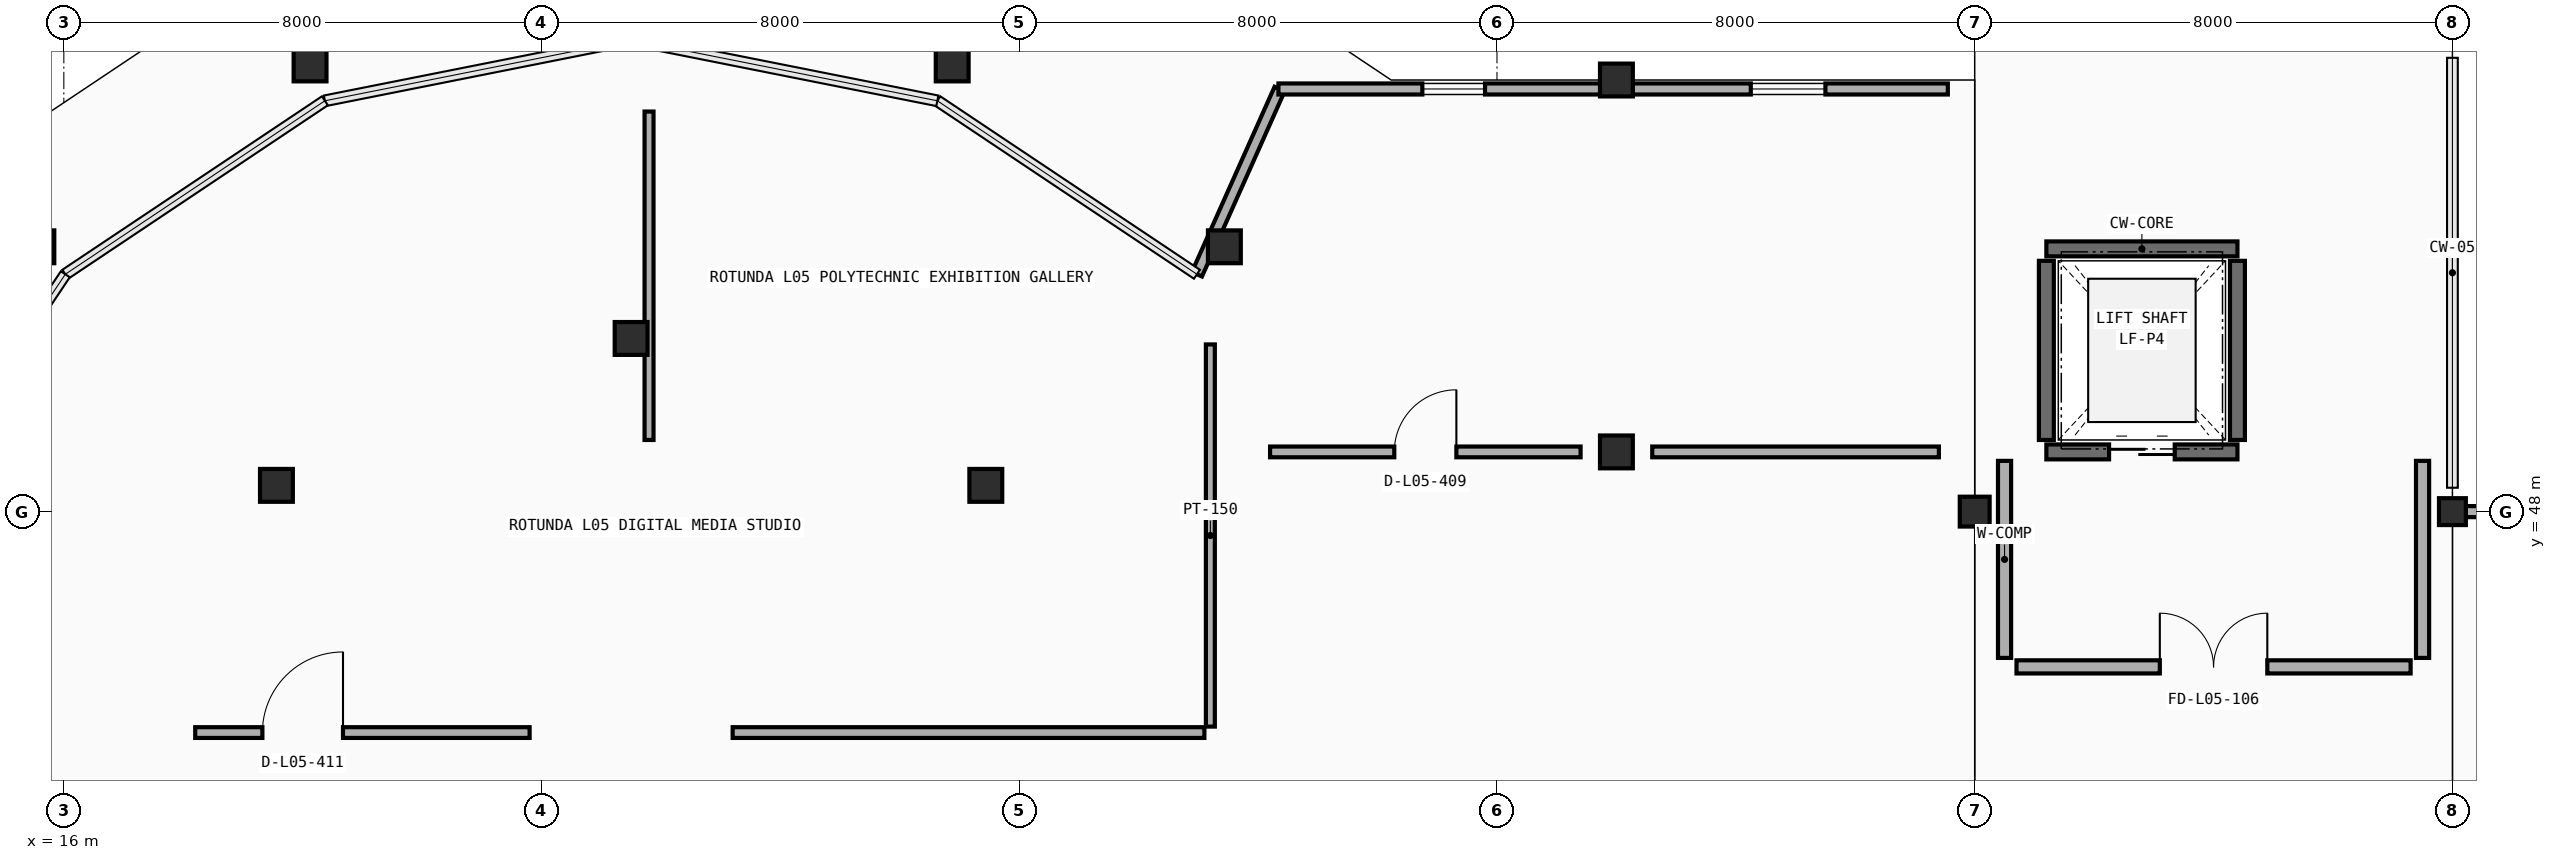
"""IFC4 building model, lengths in metres.
Left out: names, types, materials, properties, quantities, classifications, styles, units other than length and angle.
Written with IfcOpenShell. Run it as: python <this file> out.ifc"""

import sys

from ifc_helpers import new_model, si_unit, direction, frame, frame_2d, origin, origin_2d, place, context, subcontext, project, spatial, rectangle, extrude, element, fill, save


model = new_model("IFC4")
c1 = context("Model", 3, precision=1e-05, world=origin(), true_north=direction((0.0, 1.0)))
c2 = subcontext(c1, "Body", "Model", "MODEL_VIEW")
j1 = project(units=[si_unit("LENGTHUNIT", "METRE"), si_unit("PLANEANGLEUNIT", "RADIAN")], contexts=[c1])
p1 = place(None, origin())
s1 = spatial("IfcSite", under=j1, at=p1, CompositionType="ELEMENT")
p2 = place(p1, origin())
s2 = spatial("IfcBuilding", under=s1, at=p2, CompositionType="ELEMENT")
p3 = place(p2, frame((0.0, 0.0, 18.0)))
s3 = spatial("IfcBuildingStorey", under=s2, at=p3, CompositionType="ELEMENT", Elevation=18.0)
p4 = place(p3, frame((48.0, 48.0, 0.0), z_axis=(0.0, 0.0, 1.0), x_axis=(1.0, 0.0, 0.0)))
e1 = element("IfcColumn", 1, at=p4, inside=s3, PredefinedType="COLUMN", context=c2, shape_type="SweptSolid", body=[
    extrude(rectangle(XDim=0.5, YDim=0.5, at=origin_2d()), origin(), (0.0, 0.0, 1.0), 4.2),
])
p5 = place(p3, frame((56.0, 48.0, 0.0), z_axis=(0.0, 0.0, 1.0), x_axis=(1.0, 0.0, 0.0)))
e2 = element("IfcColumn", 2, at=p5, inside=s3, PredefinedType="COLUMN", context=c2, shape_type="SweptSolid", body=[
    extrude(rectangle(XDim=0.45, YDim=0.45, at=origin_2d()), origin(), (0.0, 0.0, 1.0), 4.2),
])
for number, where, z_axis, x_axis in (
    (3, (19.56, 48.44, 0.0), (0.0, 0.0, 1.0), (1.0, 0.0, 0.0)),
    (4, (31.44, 48.44, 0.0), (0.0, 0.0, 1.0), (1.0, 0.0, 0.0)),
    (5, (42.0, 49.0, 0.0), (0.0, 0.0, 1.0), (1.0, 0.0, 0.0)),
    (6, (25.5, 50.9, 0.0), (0.0, 0.0, 1.0), (1.0, 0.0, 0.0)),
    (7, (15.565, 52.435, 0.0), (0.0, 0.0, 1.0), (1.0, 0.0, 0.0)),
    (8, (35.435, 52.435, 0.0), (0.0, 0.0, 1.0), (1.0, 0.0, 0.0)),
    (9, (42.0, 55.228, 0.0), (0.0, 0.0, 1.0), (1.0, 0.0, 0.0)),
    (10, (20.123, 55.48, 0.0), (0.0, 0.0, 1.0), (1.0, 0.0, 0.0)),
    (11, (30.877, 55.48, 0.0), (0.0, 0.0, 1.0), (1.0, 0.0, 0.0)),
):
    element("IfcColumn", number, at=place(p3, frame(where, z_axis=z_axis, x_axis=x_axis)), inside=s3, PredefinedType="COLUMN", context=c2, shape_type="SweptSolid", body=[
        extrude(rectangle(XDim=0.55, YDim=0.55, at=origin_2d()), origin(), (0.0, 0.0, 1.0), 4.2),
    ])
p6 = place(p3, frame((56.222, 48.0, 0.0), z_axis=(0.0, 0.0, 1.0), x_axis=(1.0, 0.0, 0.0)))
e12 = element("IfcWall", 12, at=p6, inside=s3, PredefinedType="STANDARD", context=c2, shape_type="SweptSolid", body=[
    extrude(rectangle(XDim=7.506, YDim=0.185, at=frame_2d((3.753, 0.0))), origin(), (0.0, 0.0, 1.0), 3.35),
])
p7 = place(p6, frame((2.358, 0.0, 0.9)))
e13 = element("IfcOpeningElement", 13, at=p7, cuts=e12, PredefinedType="OPENING", context=c2, shape_type="SweptSolid", body=[
    extrude(rectangle(XDim=2.85, YDim=1.55, at=frame_2d((1.425, 0.775))), frame((0.0, 0.103, 0.0), z_axis=(0.0, -1.0, 0.0), x_axis=(1.0, 0.0, 0.0)), (0.0, 0.0, 1.0), 0.205),
])
p8 = place(p3, frame((38.143, 55.143, 0.0), z_axis=(0.0, 0.0, 1.0), x_axis=(-0.831468390799, 0.555572061125, 0.0)))
e14 = element("IfcWall", 14, at=p8, inside=s3, PredefinedType="PARAPET", context=c2, shape_type="SweptSolid", body=[
    extrude(rectangle(XDim=6.977, YDim=0.2, at=frame_2d((3.488, 0.0))), origin(), (0.0, 0.0, 1.0), 1.15),
])
p9 = place(p3, frame((19.542, 56.472, 0.0), z_axis=(0.0, 0.0, 1.0), x_axis=(-0.831481620435, -0.555552261158, 0.0)))
e15 = element("IfcWall", 15, at=p9, inside=s3, PredefinedType="PARAPET", context=c2, shape_type="SweptSolid", body=[
    extrude(rectangle(XDim=5.618, YDim=0.18, at=frame_2d((2.809, 0.0))), origin(), (0.0, 0.0, 1.0), 1.15),
])
p10 = place(p3, frame((34.975, 51.975, 0.0), z_axis=(0.0, 0.0, 1.0), x_axis=(0.40761125598, 0.913155553013, 0.0)))
e16 = element("IfcWall", 16, at=p10, inside=s3, PredefinedType="STANDARD", context=c2, shape_type="SweptSolid", body=[
    extrude(rectangle(XDim=3.398, YDim=0.185, at=frame_2d((1.699, 0.0))), origin(), (0.0, 0.0, 1.0), 3.35),
])
p11 = place(p3, frame((36.34, 55.078, 0.0), z_axis=(0.0, 0.0, 1.0), x_axis=(1.0, 0.0, 0.0)))
e17 = element("IfcWall", 17, at=p11, inside=s3, PredefinedType="STANDARD", context=c2, shape_type="SweptSolid", body=[
    extrude(rectangle(XDim=5.388, YDim=0.185, at=frame_2d((2.694, 0.0))), origin(), (0.0, 0.0, 1.0), 3.325),
])
p12 = place(p11, frame((2.41, 0.0, 0.9)))
e18 = element("IfcOpeningElement", 18, at=p12, cuts=e17, PredefinedType="OPENING", context=c2, shape_type="SweptSolid", body=[
    extrude(rectangle(XDim=1.05, YDim=1.25, at=frame_2d((0.525, 0.625))), frame((0.0, 0.103, 0.0), z_axis=(0.0, -1.0, 0.0), x_axis=(1.0, 0.0, 0.0)), (0.0, 0.0, 1.0), 0.205),
])
p13 = place(p3, frame((42.272, 55.078, 0.0), z_axis=(0.0, 0.0, 1.0), x_axis=(1.0, 0.0, 0.0)))
e19 = element("IfcWall", 19, at=p13, inside=s3, PredefinedType="STANDARD", context=c2, shape_type="SweptSolid", body=[
    extrude(rectangle(XDim=5.278, YDim=0.185, at=frame_2d((2.639, 0.0))), origin(), (0.0, 0.0, 1.0), 3.325),
])
p14 = place(p13, frame((1.978, 0.0, 0.9)))
e20 = element("IfcOpeningElement", 20, at=p14, cuts=e19, PredefinedType="OPENING", context=c2, shape_type="SweptSolid", body=[
    extrude(rectangle(XDim=1.25, YDim=1.25, at=frame_2d((0.625, 0.625))), frame((0.0, 0.103, 0.0), z_axis=(0.0, -1.0, 0.0), x_axis=(1.0, 0.0, 0.0)), (0.0, 0.0, 1.0), 0.205),
])
p15 = place(p3, frame((49.2, 49.0, 0.0), z_axis=(0.0, 0.0, 1.0), x_axis=(1.0, 0.0, 0.0)))
e21 = element("IfcWall", 21, at=p15, inside=s3, PredefinedType="SOLIDWALL", context=c2, shape_type="SweptSolid", body=[
    extrude(rectangle(XDim=3.2, YDim=0.25, at=frame_2d((1.6, 0.0))), origin(), (0.0, 0.0, 1.0), 4.2),
])
p16 = place(p15, frame((1.05, 0.0, 0.0)))
e22 = element("IfcOpeningElement", 22, at=p16, cuts=e21, PredefinedType="OPENING", context=c2, shape_type="SweptSolid", body=[
    extrude(rectangle(XDim=1.1, YDim=2.15, at=frame_2d((0.55, 1.075))), frame((0.0, 0.135, 0.0), z_axis=(0.0, -1.0, 0.0), x_axis=(1.0, 0.0, 0.0)), (0.0, 0.0, 1.0), 0.27),
])
p17 = place(p3, frame((49.2, 52.4, 0.0), z_axis=(0.0, 0.0, 1.0), x_axis=(1.0, 0.0, 0.0)))
e23 = element("IfcWall", 23, at=p17, inside=s3, PredefinedType="SOLIDWALL", context=c2, shape_type="SweptSolid", body=[
    extrude(rectangle(XDim=3.2, YDim=0.25, at=frame_2d((1.6, 0.0))), origin(), (0.0, 0.0, 1.0), 4.2),
])
for number, where, z_axis, x_axis in (
    (24, (49.2, 49.2, 0.0), (0.0, 0.0, 1.0), (0.0, 1.0, 0.0)),
    (25, (52.4, 49.2, 0.0), (0.0, 0.0, 1.0), (0.0, 1.0, 0.0)),
):
    element("IfcWall", number, at=place(p3, frame(where, z_axis=z_axis, x_axis=x_axis)), inside=s3, PredefinedType="SOLIDWALL", context=c2, shape_type="SweptSolid", body=[
        extrude(rectangle(XDim=3.0, YDim=0.25, at=frame_2d((1.5, 0.0))), origin(), (0.0, 0.0, 1.0), 4.2),
    ])
p18 = place(p3, frame((48.7, 45.4, 0.0), z_axis=(0.0, 0.0, 1.0), x_axis=(1.0, 0.0, 0.0)))
e26 = element("IfcWall", 26, at=p18, inside=s3, PredefinedType="PARTITIONING", context=c2, shape_type="SweptSolid", body=[
    extrude(rectangle(XDim=6.6, YDim=0.22, at=frame_2d((3.3, 0.0))), origin(), (0.0, 0.0, 1.0), 3.3),
])
p19 = place(p18, frame((2.4, 0.0, 0.0)))
e27 = element("IfcOpeningElement", 27, at=p19, cuts=e26, PredefinedType="OPENING", context=c2, shape_type="SweptSolid", body=[
    extrude(rectangle(XDim=1.8, YDim=2.2, at=frame_2d((0.9, 1.1))), frame((0.0, 0.12, 0.0), z_axis=(0.0, -1.0, 0.0), x_axis=(1.0, 0.0, 0.0)), (0.0, 0.0, 1.0), 0.24),
])
for number, where, z_axis, x_axis in (
    (28, (48.5, 45.55, 0.0), (0.0, 0.0, 1.0), (0.0, 1.0, 0.0)),
    (29, (55.5, 45.55, 0.0), (0.0, 0.0, 1.0), (0.0, 1.0, 0.0)),
):
    element("IfcWall", number, at=place(p3, frame(where, z_axis=z_axis, x_axis=x_axis)), inside=s3, PredefinedType="PARTITIONING", context=c2, shape_type="SweptSolid", body=[
        extrude(rectangle(XDim=3.3, YDim=0.22, at=frame_2d((1.65, 0.0))), origin(), (0.0, 0.0, 1.0), 3.3),
    ])
p20 = place(p3, frame((42.6, 49.0, 0.0), z_axis=(0.0, 0.0, 1.0), x_axis=(1.0, 0.0, 0.0)))
e30 = element("IfcWall", 30, at=p20, inside=s3, PredefinedType="PARTITIONING", context=c2, shape_type="SweptSolid", body=[
    extrude(rectangle(XDim=4.8, YDim=0.18, at=frame_2d((2.4, 0.0))), origin(), (0.0, 0.0, 1.0), 3.275),
])
p21 = place(p3, frame((25.8, 49.2, 0.0), z_axis=(0.0, 0.0, 1.0), x_axis=(0.0, 1.0, 0.0)))
e31 = element("IfcWall", 31, at=p21, inside=s3, PredefinedType="PARTITIONING", context=c2, shape_type="SweptSolid", body=[
    extrude(rectangle(XDim=5.5, YDim=0.15, at=frame_2d((2.75, 0.0))), origin(), (0.0, 0.0, 1.0), 3.175),
])
p22 = place(p3, frame((36.2, 49.0, 0.0), z_axis=(0.0, 0.0, 1.0), x_axis=(1.0, 0.0, 0.0)))
e32 = element("IfcWall", 32, at=p22, inside=s3, PredefinedType="PARTITIONING", context=c2, shape_type="SweptSolid", body=[
    extrude(rectangle(XDim=5.2, YDim=0.18, at=frame_2d((2.6, 0.0))), origin(), (0.0, 0.0, 1.0), 3.3),
])
p23 = place(p22, frame((2.08, 0.0, 0.0)))
e33 = element("IfcOpeningElement", 33, at=p23, cuts=e32, PredefinedType="OPENING", context=c2, shape_type="SweptSolid", body=[
    extrude(rectangle(XDim=1.04, YDim=2.15, at=frame_2d((0.52, 1.075))), frame((0.0, 0.1, 0.0), z_axis=(0.0, -1.0, 0.0), x_axis=(1.0, 0.0, 0.0)), (0.0, 0.0, 1.0), 0.2),
])
p24 = place(p3, frame((27.2, 44.3, 0.0), z_axis=(0.0, 0.0, 1.0), x_axis=(1.0, 0.0, 0.0)))
e34 = element("IfcWall", 34, at=p24, inside=s3, PredefinedType="PARTITIONING", context=c2, shape_type="SweptSolid", body=[
    extrude(rectangle(XDim=7.9, YDim=0.18, at=frame_2d((3.95, 0.0))), origin(), (0.0, 0.0, 1.0), 3.3),
])
p25 = place(p3, frame((35.2, 44.4, 0.0), z_axis=(0.0, 0.0, 1.0), x_axis=(0.0, 1.0, 0.0)))
e35 = element("IfcWall", 35, at=p25, inside=s3, PredefinedType="PARTITIONING", context=c2, shape_type="SweptSolid", body=[
    extrude(rectangle(XDim=6.4, YDim=0.15, at=frame_2d((3.2, 0.0))), origin(), (0.0, 0.0, 1.0), 3.3),
])
p26 = place(p3, frame((18.2, 44.3, 0.0), z_axis=(0.0, 0.0, 1.0), x_axis=(1.0, 0.0, 0.0)))
e36 = element("IfcWall", 36, at=p26, inside=s3, PredefinedType="PARTITIONING", context=c2, shape_type="SweptSolid", body=[
    extrude(rectangle(XDim=5.6, YDim=0.18, at=frame_2d((2.8, 0.0))), origin(), (0.0, 0.0, 1.0), 3.3),
])
p27 = place(p26, frame((1.125, 0.0, 0.0)))
e37 = element("IfcOpeningElement", 37, at=p27, cuts=e36, PredefinedType="OPENING", context=c2, shape_type="SweptSolid", body=[
    extrude(rectangle(XDim=1.35, YDim=2.2, at=frame_2d((0.675, 1.1))), frame((0.0, 0.1, 0.0), z_axis=(0.0, -1.0, 0.0), x_axis=(1.0, 0.0, 0.0)), (0.0, 0.0, 1.0), 0.2),
])
p28 = place(p12, origin())
e38 = element("IfcWindow", 38, at=p28, inside=s3, PartitioningType="SINGLE_PANEL", PredefinedType="WINDOW", context=c2, shape_type="SweptSolid", body=[
    extrude(rectangle(XDim=1.05, YDim=1.25, at=frame_2d((0.525, 0.625))), frame((0.0, 0.03, 0.0), z_axis=(0.0, -1.0, 0.0), x_axis=(1.0, 0.0, 0.0)), (0.0, 0.0, 1.0), 0.06),
])
fill(e18, e38)
p29 = place(p14, origin())
e39 = element("IfcWindow", 39, at=p29, inside=s3, PartitioningType="SINGLE_PANEL", PredefinedType="WINDOW", context=c2, shape_type="SweptSolid", body=[
    extrude(rectangle(XDim=1.25, YDim=1.25, at=frame_2d((0.625, 0.625))), frame((0.0, 0.03, 0.0), z_axis=(0.0, -1.0, 0.0), x_axis=(1.0, 0.0, 0.0)), (0.0, 0.0, 1.0), 0.06),
])
fill(e20, e39)
p30 = place(p16, origin())
e40 = element("IfcDoor", 40, at=p30, inside=s3, OperationType="DOUBLE_DOOR_SLIDING", PredefinedType="DOOR", context=c2, shape_type="SweptSolid", body=[
    extrude(rectangle(XDim=1.1, YDim=2.15, at=frame_2d((0.55, 1.075))), frame((0.0, 0.025, 0.0), z_axis=(0.0, -1.0, 0.0), x_axis=(1.0, 0.0, 0.0)), (0.0, 0.0, 1.0), 0.05),
])
fill(e22, e40)
p31 = place(p19, origin())
e41 = element("IfcDoor", 41, at=p31, inside=s3, OperationType="DOUBLE_DOOR_SINGLE_SWING", PredefinedType="DOOR", context=c2, shape_type="SweptSolid", body=[
    extrude(rectangle(XDim=1.8, YDim=2.2, at=frame_2d((0.9, 1.1))), frame((0.0, 0.025, 0.0), z_axis=(0.0, -1.0, 0.0), x_axis=(1.0, 0.0, 0.0)), (0.0, 0.0, 1.0), 0.05),
])
fill(e27, e41)
p32 = place(p23, origin())
e42 = element("IfcDoor", 42, at=p32, inside=s3, OperationType="SINGLE_SWING_RIGHT", PredefinedType="DOOR", context=c2, shape_type="SweptSolid", body=[
    extrude(rectangle(XDim=1.04, YDim=2.15, at=frame_2d((0.52, 1.075))), frame((0.0, 0.025, 0.0), z_axis=(0.0, -1.0, 0.0), x_axis=(1.0, 0.0, 0.0)), (0.0, 0.0, 1.0), 0.05),
])
fill(e33, e42)
p33 = place(p27, origin())
e43 = element("IfcDoor", 43, at=p33, inside=s3, OperationType="SINGLE_SWING_RIGHT", PredefinedType="DOOR", context=c2, shape_type="SweptSolid", body=[
    extrude(rectangle(XDim=1.35, YDim=2.2, at=frame_2d((0.675, 1.1))), frame((0.0, 0.025, 0.0), z_axis=(0.0, -1.0, 0.0), x_axis=(1.0, 0.0, 0.0)), (0.0, 0.0, 1.0), 0.05),
])
fill(e37, e43)
save(model, sys.argv[1])
